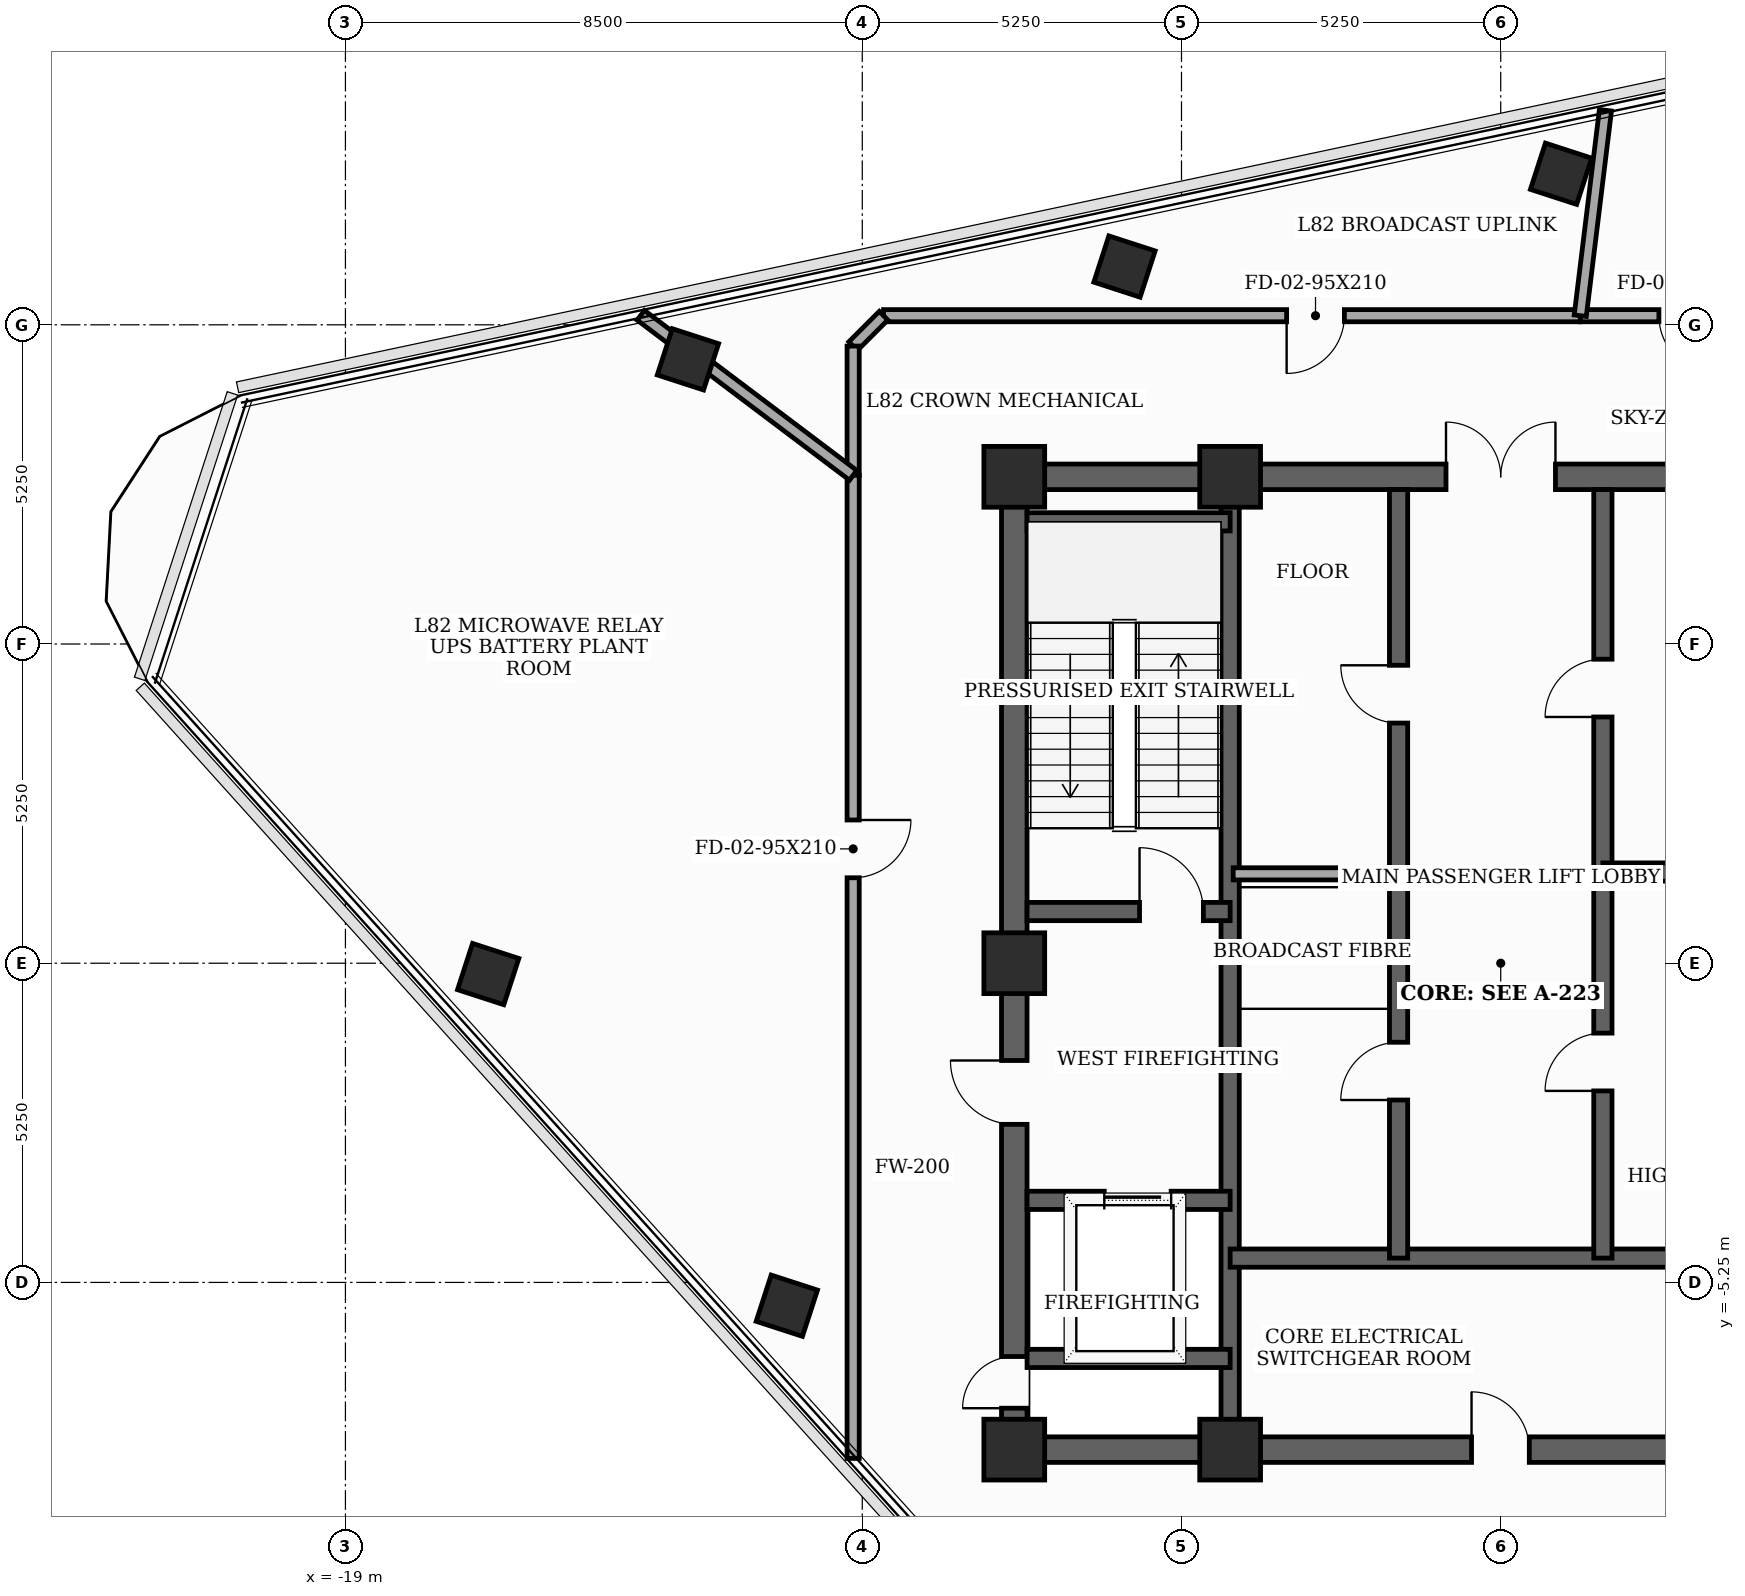
"""IFC4 building model, lengths in metres.
Left out: names, types, materials, properties, quantities, classifications, styles, units other than length and angle.
Written with IfcOpenShell. Run it as: python <this file> out.ifc"""

import sys

from ifc_helpers import new_model, si_unit, direction, frame, frame_2d, origin, origin_2d, place, context, subcontext, project, spatial, rectangle, extrude, element, fill, save


model = new_model("IFC4")
c1 = context("Model", 3, precision=1e-05, world=origin(), true_north=direction((0.0, 1.0)))
c2 = subcontext(c1, "Body", "Model", "MODEL_VIEW")
j1 = project(units=[si_unit("LENGTHUNIT", "METRE"), si_unit("PLANEANGLEUNIT", "RADIAN")], contexts=[c1])
p1 = place(None, origin())
s1 = spatial("IfcSite", under=j1, at=p1, CompositionType="ELEMENT")
p2 = place(p1, origin())
s2 = spatial("IfcBuilding", under=s1, at=p2, CompositionType="ELEMENT")
p3 = place(p2, frame((0.0, 0.0, 317.4)))
s3 = spatial("IfcBuildingStorey", under=s2, at=p3, CompositionType="ELEMENT", Elevation=317.4)
for number, where, z_axis, x_axis in (
    (1, (-8.0, -8.0, 0.0), (0.0, 0.0, 1.0), (1.0, 0.0, 0.0)),
    (2, (-4.45, -8.0, 0.0), (0.0, 0.0, 1.0), (1.0, 0.0, 0.0)),
    (3, (-4.45, 8.0, 0.0), (0.0, 0.0, 1.0), (1.0, 0.0, 0.0)),
    (4, (-8.0, 8.0, 0.0), (0.0, 0.0, 1.0), (1.0, 0.0, 0.0)),
    (5, (-8.0, 0.0, 0.0), (0.0, 0.0, 1.0), (1.0, 0.0, 0.0)),
):
    element("IfcColumn", number, at=place(p3, frame(where, z_axis=z_axis, x_axis=x_axis)), inside=s3, PredefinedType="COLUMN", context=c2, shape_type="SweptSolid", body=[
        extrude(rectangle(XDim=1.0, YDim=1.0, at=origin_2d()), origin(), (0.0, 0.0, 1.0), 4.6),
    ])
for number, where, z_axis, x_axis in (
    (6, (0.992, 12.984, 0.0), (0.0, 0.0, 1.0), (0.309, 0.951, 0.0)),
    (7, (-6.188, 11.458, 0.0), (0.0, 0.0, 1.0), (0.309, 0.951, 0.0)),
    (8, (-13.367, 9.932, 0.0), (0.0, 0.0, 1.0), (0.309, 0.951, 0.0)),
    (9, (-16.652, -0.178, 0.0), (0.0, 0.0, 1.0), (0.309, 0.951, 0.0)),
    (10, (-11.741, -5.633, 0.0), (0.0, 0.0, 1.0), (0.309, 0.951, 0.0)),
):
    element("IfcColumn", number, at=place(p3, frame(where, z_axis=z_axis, x_axis=x_axis)), inside=s3, PredefinedType="COLUMN", context=c2, shape_type="SweptSolid", body=[
        extrude(rectangle(XDim=0.8, YDim=0.8, at=origin_2d()), origin(), (0.0, 0.0, 1.0), 4.6),
    ])
p4 = place(p3, frame((-8.0, -8.0, 0.0), z_axis=(0.0, 0.0, 1.0), x_axis=(0.0, 1.0, 0.0)))
e11 = element("IfcWall", 11, at=p4, inside=s3, PredefinedType="SHEAR", context=c2, shape_type="SweptSolid", body=[
    extrude(rectangle(XDim=16.0, YDim=0.42, at=frame_2d((8.0, 0.0))), origin(), (0.0, 0.0, 1.0), 4.38),
])
p5 = place(p4, frame((0.681, 0.0, 0.0)))
e12 = element("IfcOpeningElement", 12, at=p5, cuts=e11, PredefinedType="OPENING", context=c2, shape_type="SweptSolid", body=[
    extrude(rectangle(XDim=0.85, YDim=2.02, at=frame_2d((0.425, 1.01))), frame((0.0, 0.22, 0.0), z_axis=(0.0, -1.0, 0.0), x_axis=(1.0, 0.0, 0.0)), (0.0, 0.0, 1.0), 0.44),
])
p6 = place(p4, frame((5.35, 0.0, 0.0)))
e13 = element("IfcOpeningElement", 13, at=p6, cuts=e11, PredefinedType="OPENING", context=c2, shape_type="SweptSolid", body=[
    extrude(rectangle(XDim=1.05, YDim=2.15, at=frame_2d((0.525, 1.075))), frame((0.0, 0.22, 0.0), z_axis=(0.0, -1.0, 0.0), x_axis=(1.0, 0.0, 0.0)), (0.0, 0.0, 1.0), 0.44),
])
p7 = place(p3, frame((-8.0, -8.0, 0.0), z_axis=(0.0, 0.0, 1.0), x_axis=(1.0, 0.0, 0.0)))
e14 = element("IfcWall", 14, at=p7, inside=s3, PredefinedType="SHEAR", context=c2, shape_type="SweptSolid", body=[
    extrude(rectangle(XDim=16.0, YDim=0.42, at=frame_2d((8.0, 0.0))), origin(), (0.0, 0.0, 1.0), 4.38),
])
p8 = place(p7, frame((7.52, 0.0, 0.0)))
e15 = element("IfcOpeningElement", 15, at=p8, cuts=e14, PredefinedType="OPENING", context=c2, shape_type="SweptSolid", body=[
    extrude(rectangle(XDim=0.95, YDim=2.1, at=frame_2d((0.475, 1.05))), frame((0.0, 0.22, 0.0), z_axis=(0.0, -1.0, 0.0), x_axis=(1.0, 0.0, 0.0)), (0.0, 0.0, 1.0), 0.44),
])
p9 = place(p3, frame((-8.0, 8.0, 0.0), z_axis=(0.0, 0.0, 1.0), x_axis=(1.0, 0.0, 0.0)))
e16 = element("IfcWall", 16, at=p9, inside=s3, PredefinedType="SHEAR", context=c2, shape_type="SweptSolid", body=[
    extrude(rectangle(XDim=16.0, YDim=0.42, at=frame_2d((8.0, 0.0))), origin(), (0.0, 0.0, 1.0), 4.38),
])
p10 = place(p9, frame((7.1, 0.0, 0.0)))
e17 = element("IfcOpeningElement", 17, at=p10, cuts=e16, PredefinedType="OPENING", context=c2, shape_type="SweptSolid", body=[
    extrude(rectangle(XDim=1.8, YDim=2.15, at=frame_2d((0.9, 1.075))), frame((0.0, 0.22, 0.0), z_axis=(0.0, -1.0, 0.0), x_axis=(1.0, 0.0, 0.0)), (0.0, 0.0, 1.0), 0.44),
])
p11 = place(p3, frame((-4.45, -7.79, 0.0), z_axis=(0.0, 0.0, 1.0), x_axis=(0.0, 1.0, 0.0)))
e18 = element("IfcWall", 18, at=p11, inside=s3, PredefinedType="SHEAR", context=c2, shape_type="SweptSolid", body=[
    extrude(rectangle(XDim=15.58, YDim=0.3, at=frame_2d((7.79, 0.0))), origin(), (0.0, 0.0, 1.0), 4.38),
])
p12 = place(p3, frame((-7.79, 0.85, 0.0), z_axis=(0.0, 0.0, 1.0), x_axis=(1.0, 0.0, 0.0)))
e19 = element("IfcWall", 19, at=p12, inside=s3, PredefinedType="SHEAR", context=c2, shape_type="SweptSolid", body=[
    extrude(rectangle(XDim=3.34, YDim=0.3, at=frame_2d((1.67, 0.0))), origin(), (0.0, 0.0, 1.0), 4.38),
])
p13 = place(p12, frame((1.85, 0.0, 0.0)))
e20 = element("IfcOpeningElement", 20, at=p13, cuts=e19, PredefinedType="OPENING", context=c2, shape_type="SweptSolid", body=[
    extrude(rectangle(XDim=1.05, YDim=2.15, at=frame_2d((0.525, 1.075))), frame((0.0, 0.16, 0.0), z_axis=(0.0, -1.0, 0.0), x_axis=(1.0, 0.0, 0.0)), (0.0, 0.0, 1.0), 0.32),
])
p14 = place(p3, frame((-7.79, 7.26, 0.0), z_axis=(0.0, 0.0, 1.0), x_axis=(1.0, 0.0, 0.0)))
e21 = element("IfcWall", 21, at=p14, inside=s3, PredefinedType="SHEAR", context=c2, shape_type="SweptSolid", body=[
    extrude(rectangle(XDim=3.34, YDim=0.3, at=frame_2d((1.67, 0.0))), origin(), (0.0, 0.0, 1.0), 4.38),
])
p15 = place(p3, frame((-7.79, -3.9, 0.0), z_axis=(0.0, 0.0, 1.0), x_axis=(1.0, 0.0, 0.0)))
e22 = element("IfcWall", 22, at=p15, inside=s3, PredefinedType="SHEAR", context=c2, shape_type="SweptSolid", body=[
    extrude(rectangle(XDim=3.34, YDim=0.3, at=frame_2d((1.67, 0.0))), origin(), (0.0, 0.0, 1.0), 4.38),
])
p16 = place(p15, frame((1.27, 0.0, 0.0)))
e23 = element("IfcOpeningElement", 23, at=p16, cuts=e22, PredefinedType="OPENING", context=c2, shape_type="SweptSolid", body=[
    extrude(rectangle(XDim=1.1, YDim=2.1, at=frame_2d((0.55, 1.05))), frame((0.0, 0.16, 0.0), z_axis=(0.0, -1.0, 0.0), x_axis=(1.0, 0.0, 0.0)), (0.0, 0.0, 1.0), 0.32),
])
p17 = place(p3, frame((-7.79, -6.5, 0.0), z_axis=(0.0, 0.0, 1.0), x_axis=(1.0, 0.0, 0.0)))
e24 = element("IfcWall", 24, at=p17, inside=s3, PredefinedType="SHEAR", context=c2, shape_type="SweptSolid", body=[
    extrude(rectangle(XDim=3.34, YDim=0.3, at=frame_2d((1.67, 0.0))), origin(), (0.0, 0.0, 1.0), 4.38),
])
p18 = place(p3, frame((-4.45, -4.85, 0.0), z_axis=(0.0, 0.0, 1.0), x_axis=(1.0, 0.0, 0.0)))
e25 = element("IfcWall", 25, at=p18, inside=s3, PredefinedType="SHEAR", context=c2, shape_type="SweptSolid", body=[
    extrude(rectangle(XDim=8.9, YDim=0.3, at=frame_2d((4.45, 0.0))), origin(), (0.0, 0.0, 1.0), 4.38),
])
p19 = place(p3, frame((-1.68, -4.85, 0.0), z_axis=(0.0, 0.0, 1.0), x_axis=(0.0, 1.0, 0.0)))
e26 = element("IfcWall", 26, at=p19, inside=s3, PredefinedType="SHEAR", context=c2, shape_type="SweptSolid", body=[
    extrude(rectangle(XDim=12.64, YDim=0.3, at=frame_2d((6.32, 0.0))), origin(), (0.0, 0.0, 1.0), 4.38),
])
p20 = place(p19, frame((2.6, 0.0, 0.0)))
e27 = element("IfcOpeningElement", 27, at=p20, cuts=e26, PredefinedType="OPENING", context=c2, shape_type="SweptSolid", body=[
    extrude(rectangle(XDim=0.95, YDim=2.1, at=frame_2d((0.475, 1.05))), frame((0.0, 0.16, 0.0), z_axis=(0.0, -1.0, 0.0), x_axis=(1.0, 0.0, 0.0)), (0.0, 0.0, 1.0), 0.32),
])
p21 = place(p19, frame((8.8, 0.0, 0.0)))
e28 = element("IfcOpeningElement", 28, at=p21, cuts=e26, PredefinedType="OPENING", context=c2, shape_type="SweptSolid", body=[
    extrude(rectangle(XDim=0.95, YDim=2.1, at=frame_2d((0.475, 1.05))), frame((0.0, 0.16, 0.0), z_axis=(0.0, -1.0, 0.0), x_axis=(1.0, 0.0, 0.0)), (0.0, 0.0, 1.0), 0.32),
])
p22 = place(p3, frame((1.68, -4.85, 0.0), z_axis=(0.0, 0.0, 1.0), x_axis=(0.0, 1.0, 0.0)))
e29 = element("IfcWall", 29, at=p22, inside=s3, PredefinedType="SHEAR", context=c2, shape_type="SweptSolid", body=[
    extrude(rectangle(XDim=12.64, YDim=0.3, at=frame_2d((6.32, 0.0))), origin(), (0.0, 0.0, 1.0), 4.38),
])
p23 = place(p22, frame((2.75, 0.0, 0.0)))
e30 = element("IfcOpeningElement", 30, at=p23, cuts=e29, PredefinedType="OPENING", context=c2, shape_type="SweptSolid", body=[
    extrude(rectangle(XDim=0.95, YDim=2.1, at=frame_2d((0.475, 1.05))), frame((0.0, 0.16, 0.0), z_axis=(0.0, -1.0, 0.0), x_axis=(1.0, 0.0, 0.0)), (0.0, 0.0, 1.0), 0.32),
])
p24 = place(p22, frame((8.9, 0.0, 0.0)))
e31 = element("IfcOpeningElement", 31, at=p24, cuts=e29, PredefinedType="OPENING", context=c2, shape_type="SweptSolid", body=[
    extrude(rectangle(XDim=0.95, YDim=2.1, at=frame_2d((0.475, 1.05))), frame((0.0, 0.16, 0.0), z_axis=(0.0, -1.0, 0.0), x_axis=(1.0, 0.0, 0.0)), (0.0, 0.0, 1.0), 0.32),
])
p25 = place(p3, frame((1.68, 1.5, 0.0), z_axis=(0.0, 0.0, 1.0), x_axis=(1.0, 0.0, 0.0)))
e32 = element("IfcWall", 32, at=p25, inside=s3, PredefinedType="SHEAR", context=c2, shape_type="SweptSolid", body=[
    extrude(rectangle(XDim=2.77, YDim=0.3, at=frame_2d((1.385, 0.0))), origin(), (0.0, 0.0, 1.0), 4.38),
])
p26 = place(p3, frame((-4.4, 1.47, 0.0), z_axis=(0.0, 0.0, 1.0), x_axis=(1.0, 0.0, 0.0)))
e33 = element("IfcWall", 33, at=p26, inside=s3, PredefinedType="SOLIDWALL", context=c2, shape_type="SweptSolid", body=[
    extrude(rectangle(XDim=2.68, YDim=0.2, at=frame_2d((1.34, 0.0))), origin(), (0.0, 0.0, 1.0), 2.685),
])
p27 = place(p3, frame((10.15, 10.65, 0.0), z_axis=(0.0, 0.0, 1.0), x_axis=(-1.0, 0.0, 0.0)))
e34 = element("IfcWall", 34, at=p27, inside=s3, PredefinedType="SOLIDWALL", context=c2, shape_type="SweptSolid", body=[
    extrude(rectangle(XDim=8.842, YDim=0.2, at=frame_2d((4.421, 0.0))), origin(), (0.0, 0.0, 1.0), 2.965),
])
p28 = place(p27, frame((6.599, 0.0, 0.0)))
e35 = element("IfcOpeningElement", 35, at=p28, cuts=e34, PredefinedType="OPENING", context=c2, shape_type="SweptSolid", body=[
    extrude(rectangle(XDim=0.95, YDim=2.1, at=frame_2d((0.475, 1.05))), frame((0.0, 0.11, 0.0), z_axis=(0.0, -1.0, 0.0), x_axis=(1.0, 0.0, 0.0)), (0.0, 0.0, 1.0), 0.22),
])
p29 = place(p3, frame((1.308, 10.65, 0.0), z_axis=(0.0, 0.0, 1.0), x_axis=(-1.0, 0.0, 0.0)))
e36 = element("IfcWall", 36, at=p29, inside=s3, PredefinedType="SOLIDWALL", context=c2, shape_type="SweptSolid", body=[
    extrude(rectangle(XDim=11.458, YDim=0.2, at=frame_2d((5.729, 0.0))), origin(), (0.0, 0.0, 1.0), 2.965),
])
p30 = place(p29, frame((3.879, 0.0, 0.0)))
e37 = element("IfcOpeningElement", 37, at=p30, cuts=e36, PredefinedType="OPENING", context=c2, shape_type="SweptSolid", body=[
    extrude(rectangle(XDim=0.95, YDim=2.1, at=frame_2d((0.475, 1.05))), frame((0.0, 0.11, 0.0), z_axis=(0.0, -1.0, 0.0), x_axis=(1.0, 0.0, 0.0)), (0.0, 0.0, 1.0), 0.22),
])
p31 = place(p3, frame((-10.15, 10.65, 0.0), z_axis=(0.0, 0.0, 1.0), x_axis=(-0.707106781187, -0.707106781187, 0.0)))
e38 = element("IfcWall", 38, at=p31, inside=s3, PredefinedType="SOLIDWALL", context=c2, shape_type="SweptSolid", body=[
    extrude(rectangle(XDim=0.707, YDim=0.2, at=frame_2d((0.354, 0.0))), origin(), (0.0, 0.0, 1.0), 2.965),
])
p32 = place(p3, frame((-10.65, 10.15, 0.0), z_axis=(0.0, 0.0, 1.0), x_axis=(0.0, -1.0, 0.0)))
e39 = element("IfcWall", 39, at=p32, inside=s3, PredefinedType="SOLIDWALL", context=c2, shape_type="SweptSolid", body=[
    extrude(rectangle(XDim=2.125, YDim=0.2, at=frame_2d((1.062, 0.0))), origin(), (0.0, 0.0, 1.0), 2.965),
])
p33 = place(p3, frame((-10.65, 8.025, 0.0), z_axis=(0.0, 0.0, 1.0), x_axis=(0.0, -1.0, 0.0)))
e40 = element("IfcWall", 40, at=p33, inside=s3, PredefinedType="SOLIDWALL", context=c2, shape_type="SweptSolid", body=[
    extrude(rectangle(XDim=16.17, YDim=0.2, at=frame_2d((8.085, 0.0))), origin(), (0.0, 0.0, 1.0), 2.965),
])
p34 = place(p33, frame((5.669, 0.0, 0.0)))
e41 = element("IfcOpeningElement", 41, at=p34, cuts=e40, PredefinedType="OPENING", context=c2, shape_type="SweptSolid", body=[
    extrude(rectangle(XDim=0.95, YDim=2.1, at=frame_2d((0.475, 1.05))), frame((0.0, 0.11, 0.0), z_axis=(0.0, -1.0, 0.0), x_axis=(1.0, 0.0, 0.0)), (0.0, 0.0, 1.0), 0.22),
])
p35 = place(p3, frame((1.722, 14.029, 0.0), z_axis=(0.0, 0.0, 1.0), x_axis=(-0.121624820563, -0.992576144698, 0.0)))
e42 = element("IfcWall", 42, at=p35, inside=s3, PredefinedType="SOLIDWALL", context=c2, shape_type="SweptSolid", body=[
    extrude(rectangle(XDim=3.405, YDim=0.2, at=frame_2d((1.702, 0.0))), origin(), (0.0, 0.0, 1.0), 2.965),
])
p36 = place(p3, frame((-14.142, 10.657, 0.0), z_axis=(0.0, 0.0, 1.0), x_axis=(0.798597693883, -0.601865203617, 0.0)))
e43 = element("IfcWall", 43, at=p36, inside=s3, PredefinedType="SOLIDWALL", context=c2, shape_type="SweptSolid", body=[
    extrude(rectangle(XDim=4.373, YDim=0.2, at=frame_2d((2.187, 0.0))), origin(), (0.0, 0.0, 1.0), 2.965),
])
p37 = place(p5, origin())
e44 = element("IfcDoor", 44, at=p37, inside=s3, OperationType="SINGLE_SWING_LEFT", PredefinedType="TRAPDOOR", context=c2, shape_type="SweptSolid", body=[
    extrude(rectangle(XDim=0.85, YDim=2.02, at=frame_2d((0.425, 1.01))), frame((0.0, 0.025, 0.0), z_axis=(0.0, -1.0, 0.0), x_axis=(1.0, 0.0, 0.0)), (0.0, 0.0, 1.0), 0.05),
])
fill(e12, e44)
p38 = place(p6, origin())
e45 = element("IfcDoor", 45, at=p38, inside=s3, OperationType="SINGLE_SWING_RIGHT", PredefinedType="DOOR", context=c2, shape_type="SweptSolid", body=[
    extrude(rectangle(XDim=1.05, YDim=2.15, at=frame_2d((0.525, 1.075))), frame((0.0, 0.025, 0.0), z_axis=(0.0, -1.0, 0.0), x_axis=(1.0, 0.0, 0.0)), (0.0, 0.0, 1.0), 0.05),
])
fill(e13, e45)
p39 = place(p8, origin())
e46 = element("IfcDoor", 46, at=p39, inside=s3, OperationType="SINGLE_SWING_LEFT", PredefinedType="DOOR", context=c2, shape_type="SweptSolid", body=[
    extrude(rectangle(XDim=0.95, YDim=2.1, at=frame_2d((0.475, 1.05))), frame((0.0, 0.025, 0.0), z_axis=(0.0, -1.0, 0.0), x_axis=(1.0, 0.0, 0.0)), (0.0, 0.0, 1.0), 0.05),
])
fill(e15, e46)
p40 = place(p10, origin())
e47 = element("IfcDoor", 47, at=p40, inside=s3, OperationType="DOUBLE_DOOR_SINGLE_SWING", PredefinedType="DOOR", context=c2, shape_type="SweptSolid", body=[
    extrude(rectangle(XDim=1.8, YDim=2.15, at=frame_2d((0.9, 1.075))), frame((0.0, 0.025, 0.0), z_axis=(0.0, -1.0, 0.0), x_axis=(1.0, 0.0, 0.0)), (0.0, 0.0, 1.0), 0.05),
])
fill(e17, e47)
p41 = place(p13, origin())
e48 = element("IfcDoor", 48, at=p41, inside=s3, OperationType="SINGLE_SWING_LEFT", PredefinedType="DOOR", context=c2, shape_type="SweptSolid", body=[
    extrude(rectangle(XDim=1.05, YDim=2.15, at=frame_2d((0.525, 1.075))), frame((0.0, 0.025, 0.0), z_axis=(0.0, -1.0, 0.0), x_axis=(1.0, 0.0, 0.0)), (0.0, 0.0, 1.0), 0.05),
])
fill(e20, e48)
p42 = place(p16, origin())
e49 = element("IfcDoor", 49, at=p42, inside=s3, OperationType="SLIDING_TO_LEFT", PredefinedType="DOOR", context=c2, shape_type="SweptSolid", body=[
    extrude(rectangle(XDim=1.1, YDim=2.1, at=frame_2d((0.55, 1.05))), frame((0.0, 0.025, 0.0), z_axis=(0.0, -1.0, 0.0), x_axis=(1.0, 0.0, 0.0)), (0.0, 0.0, 1.0), 0.05),
])
fill(e23, e49)
p43 = place(p20, origin())
e50 = element("IfcDoor", 50, at=p43, inside=s3, OperationType="SINGLE_SWING_LEFT", PredefinedType="DOOR", context=c2, shape_type="SweptSolid", body=[
    extrude(rectangle(XDim=0.95, YDim=2.1, at=frame_2d((0.475, 1.05))), frame((0.0, 0.025, 0.0), z_axis=(0.0, -1.0, 0.0), x_axis=(1.0, 0.0, 0.0)), (0.0, 0.0, 1.0), 0.05),
])
fill(e27, e50)
p44 = place(p21, origin())
e51 = element("IfcDoor", 51, at=p44, inside=s3, OperationType="SINGLE_SWING_RIGHT", PredefinedType="DOOR", context=c2, shape_type="SweptSolid", body=[
    extrude(rectangle(XDim=0.95, YDim=2.1, at=frame_2d((0.475, 1.05))), frame((0.0, 0.025, 0.0), z_axis=(0.0, -1.0, 0.0), x_axis=(1.0, 0.0, 0.0)), (0.0, 0.0, 1.0), 0.05),
])
fill(e28, e51)
p45 = place(p23, origin())
e52 = element("IfcDoor", 52, at=p45, inside=s3, OperationType="SINGLE_SWING_LEFT", PredefinedType="DOOR", context=c2, shape_type="SweptSolid", body=[
    extrude(rectangle(XDim=0.95, YDim=2.1, at=frame_2d((0.475, 1.05))), frame((0.0, 0.025, 0.0), z_axis=(0.0, -1.0, 0.0), x_axis=(1.0, 0.0, 0.0)), (0.0, 0.0, 1.0), 0.05),
])
fill(e30, e52)
p46 = place(p24, origin())
e53 = element("IfcDoor", 53, at=p46, inside=s3, OperationType="SINGLE_SWING_LEFT", PredefinedType="DOOR", context=c2, shape_type="SweptSolid", body=[
    extrude(rectangle(XDim=0.95, YDim=2.1, at=frame_2d((0.475, 1.05))), frame((0.0, 0.025, 0.0), z_axis=(0.0, -1.0, 0.0), x_axis=(1.0, 0.0, 0.0)), (0.0, 0.0, 1.0), 0.05),
])
fill(e31, e53)
p47 = place(p28, origin())
e54 = element("IfcDoor", 54, at=p47, inside=s3, OperationType="SINGLE_SWING_LEFT", PredefinedType="DOOR", context=c2, shape_type="SweptSolid", body=[
    extrude(rectangle(XDim=0.95, YDim=2.1, at=frame_2d((0.475, 1.05))), frame((0.0, 0.025, 0.0), z_axis=(0.0, -1.0, 0.0), x_axis=(1.0, 0.0, 0.0)), (0.0, 0.0, 1.0), 0.05),
])
fill(e35, e54)
p48 = place(p30, origin())
e55 = element("IfcDoor", 55, at=p48, inside=s3, OperationType="SINGLE_SWING_RIGHT", PredefinedType="DOOR", context=c2, shape_type="SweptSolid", body=[
    extrude(rectangle(XDim=0.95, YDim=2.1, at=frame_2d((0.475, 1.05))), frame((0.0, 0.025, 0.0), z_axis=(0.0, -1.0, 0.0), x_axis=(1.0, 0.0, 0.0)), (0.0, 0.0, 1.0), 0.05),
])
fill(e37, e55)
p49 = place(p34, origin())
e56 = element("IfcDoor", 56, at=p49, inside=s3, OperationType="SINGLE_SWING_LEFT", PredefinedType="DOOR", context=c2, shape_type="SweptSolid", body=[
    extrude(rectangle(XDim=0.95, YDim=2.1, at=frame_2d((0.475, 1.05))), frame((0.0, 0.025, 0.0), z_axis=(0.0, -1.0, 0.0), x_axis=(1.0, 0.0, 0.0)), (0.0, 0.0, 1.0), 0.05),
])
fill(e41, e56)
save(model, sys.argv[1])
